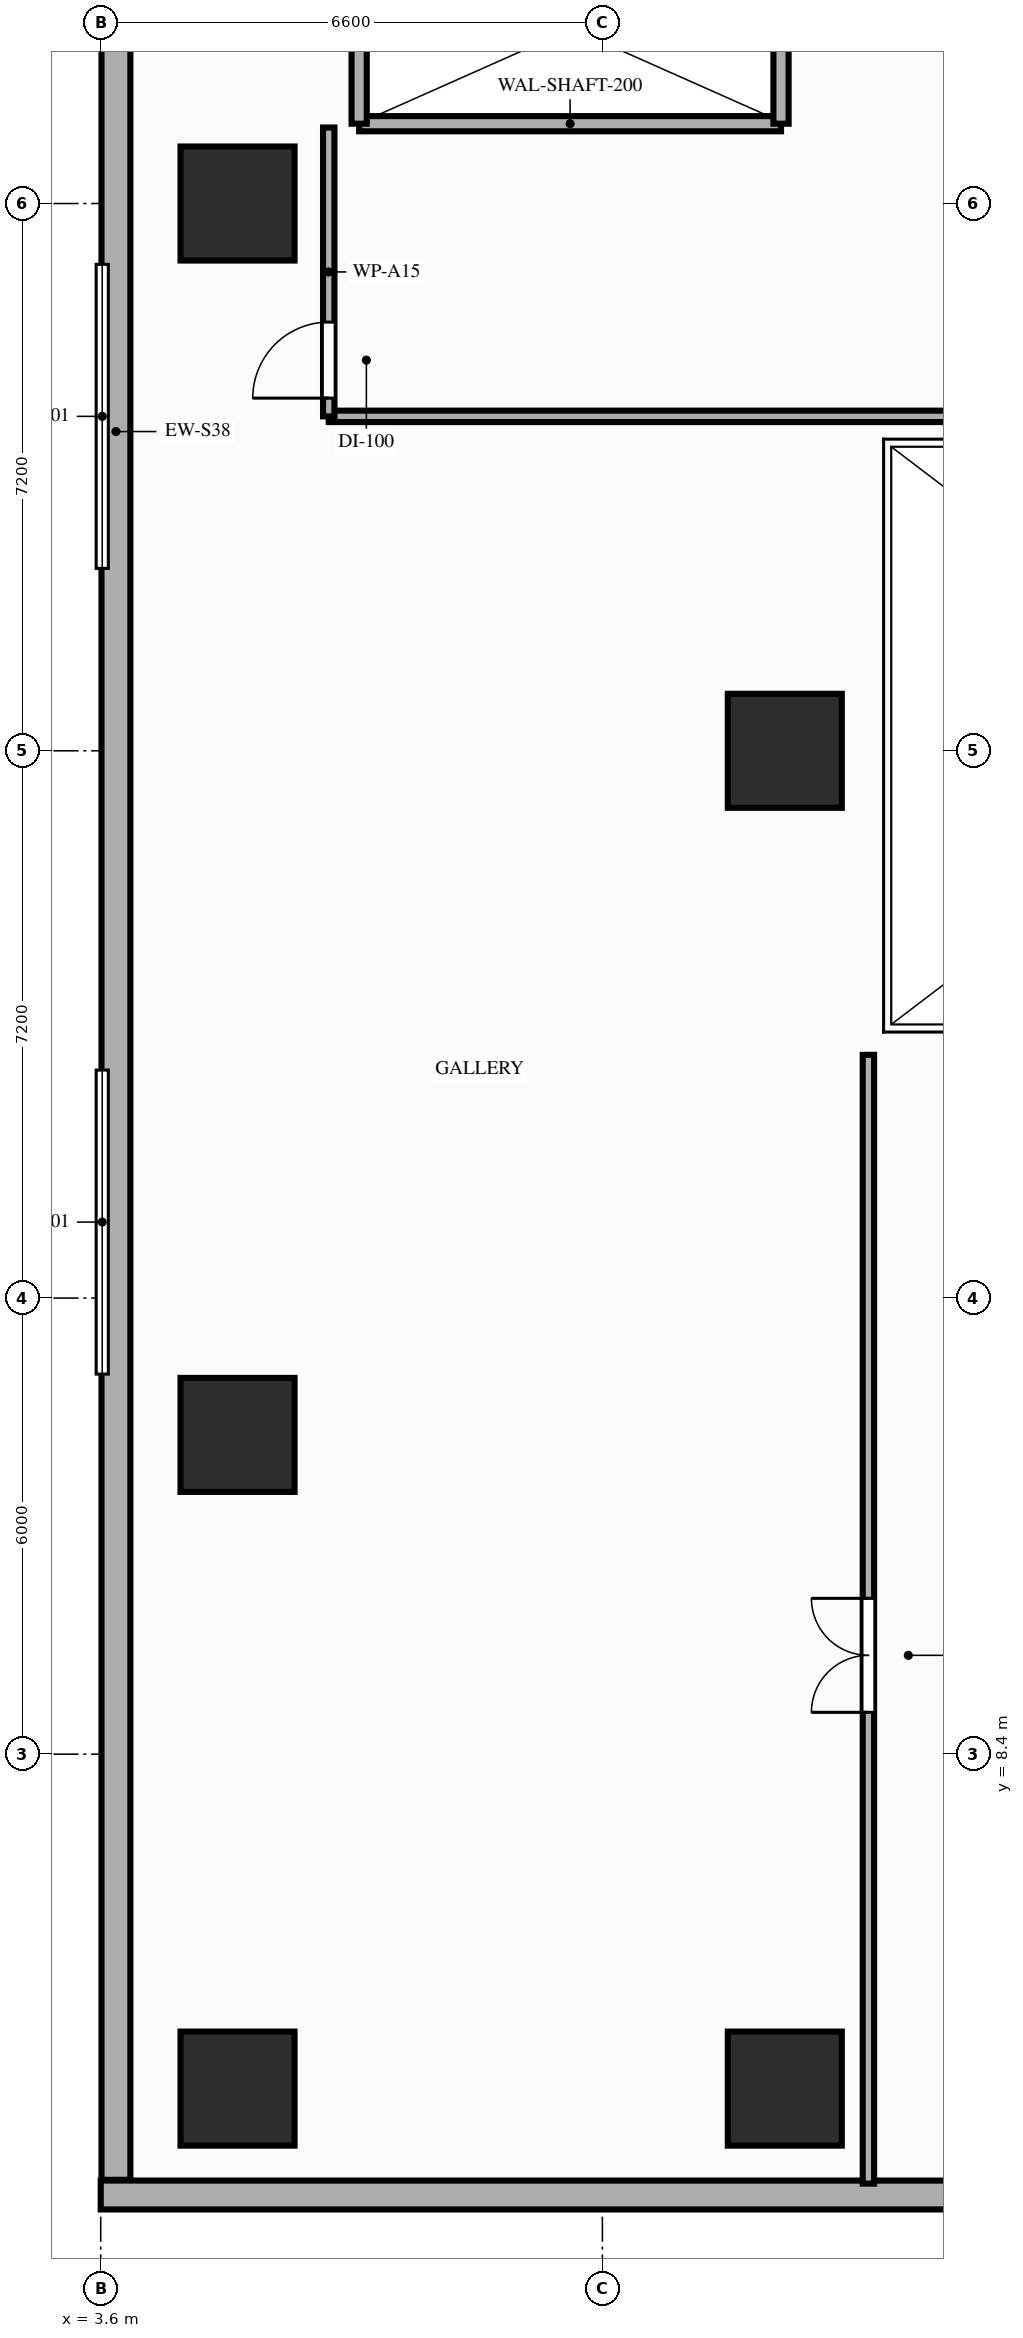
"""IFC4 building model, lengths in metres.
Left out: names, types, materials, properties, quantities, classifications, styles, units other than length and angle.
Written with IfcOpenShell. Run it as: python <this file> out.ifc"""

import sys

from ifc_helpers import new_model, si_unit, direction, frame, frame_2d, origin, origin_2d, place, context, subcontext, project, spatial, rectangle, extrude, element, fill, save


model = new_model("IFC4")
c1 = context("Model", 3, precision=1e-05, world=origin(), true_north=direction((0.0, 1.0)))
c2 = subcontext(c1, "Body", "Model", "MODEL_VIEW")
j1 = project(units=[si_unit("LENGTHUNIT", "METRE"), si_unit("PLANEANGLEUNIT", "RADIAN")], contexts=[c1])
p1 = place(None, origin())
s1 = spatial("IfcSite", under=j1, at=p1, CompositionType="ELEMENT")
p2 = place(p1, origin())
s2 = spatial("IfcBuilding", under=s1, at=p2, CompositionType="ELEMENT")
p3 = place(p2, frame((0.0, 0.0, 8.8)))
s3 = spatial("IfcBuildingStorey", under=s2, at=p3, CompositionType="ELEMENT", Elevation=8.8)
for number, where, z_axis, x_axis in (
    (1, (5.4, 12.6, 0.0), (0.0, 0.0, 1.0), (1.0, 0.0, 0.0)),
    (2, (5.4, 28.8, 0.0), (0.0, 0.0, 1.0), (1.0, 0.0, 0.0)),
    (3, (5.4, 4.0, 0.0), (0.0, 0.0, 1.0), (1.0, 0.0, 0.0)),
    (4, (12.6, 4.0, 0.0), (0.0, 0.0, 1.0), (1.0, 0.0, 0.0)),
    (5, (12.6, 21.6, 0.0), (0.0, 0.0, 1.0), (1.0, 0.0, 0.0)),
):
    element("IfcColumn", number, at=place(p3, frame(where, z_axis=z_axis, x_axis=x_axis)), inside=s3, PredefinedType="COLUMN", context=c2, shape_type="SweptSolid", body=[
        extrude(rectangle(XDim=1.5, YDim=1.5, at=origin_2d()), origin(), (0.0, 0.0, 1.0), 4.2),
    ])
p4 = place(p3, frame((3.6, 2.6, 0.0), z_axis=(0.0, 0.0, 1.0), x_axis=(1.0, 0.0, 0.0)))
e6 = element("IfcWall", 6, at=p4, inside=s3, PredefinedType="STANDARD", context=c2, shape_type="SweptSolid", body=[
    extrude(rectangle(XDim=69.6, YDim=0.38, at=frame_2d((34.8, 0.0))), origin(), (0.0, 0.0, 1.0), 3.95),
])
p5 = place(p4, frame((17.2, 0.0, 0.9)))
e7 = element("IfcOpeningElement", 7, at=p5, cuts=e6, PredefinedType="OPENING", context=c2, shape_type="SweptSolid", body=[
    extrude(rectangle(XDim=2.8, YDim=2.2, at=frame_2d((1.4, 1.1))), frame((0.0, 0.2, 0.0), z_axis=(0.0, -1.0, 0.0), x_axis=(1.0, 0.0, 0.0)), (0.0, 0.0, 1.0), 0.4),
])
p6 = place(p4, frame((24.6, 0.0, 0.9)))
e8 = element("IfcOpeningElement", 8, at=p6, cuts=e6, PredefinedType="OPENING", context=c2, shape_type="SweptSolid", body=[
    extrude(rectangle(XDim=2.8, YDim=2.2, at=frame_2d((1.4, 1.1))), frame((0.0, 0.2, 0.0), z_axis=(0.0, -1.0, 0.0), x_axis=(1.0, 0.0, 0.0)), (0.0, 0.0, 1.0), 0.4),
])
p7 = place(p4, frame((36.2, 0.0, 0.9)))
e9 = element("IfcOpeningElement", 9, at=p7, cuts=e6, PredefinedType="OPENING", context=c2, shape_type="SweptSolid", body=[
    extrude(rectangle(XDim=2.8, YDim=2.2, at=frame_2d((1.4, 1.1))), frame((0.0, 0.2, 0.0), z_axis=(0.0, -1.0, 0.0), x_axis=(1.0, 0.0, 0.0)), (0.0, 0.0, 1.0), 0.4),
])
p8 = place(p4, frame((48.4, 0.0, 0.9)))
e10 = element("IfcOpeningElement", 10, at=p8, cuts=e6, PredefinedType="OPENING", context=c2, shape_type="SweptSolid", body=[
    extrude(rectangle(XDim=2.8, YDim=2.2, at=frame_2d((1.4, 1.1))), frame((0.0, 0.2, 0.0), z_axis=(0.0, -1.0, 0.0), x_axis=(1.0, 0.0, 0.0)), (0.0, 0.0, 1.0), 0.4),
])
p9 = place(p4, frame((64.0, 0.0, 0.9)))
e11 = element("IfcOpeningElement", 11, at=p9, cuts=e6, PredefinedType="OPENING", context=c2, shape_type="SweptSolid", body=[
    extrude(rectangle(XDim=2.8, YDim=2.2, at=frame_2d((1.4, 1.1))), frame((0.0, 0.2, 0.0), z_axis=(0.0, -1.0, 0.0), x_axis=(1.0, 0.0, 0.0)), (0.0, 0.0, 1.0), 0.4),
])
p10 = place(p3, frame((3.8, 48.8, 0.0), z_axis=(0.0, 0.0, 1.0), x_axis=(0.0, -1.0, 0.0)))
e12 = element("IfcWall", 12, at=p10, inside=s3, PredefinedType="STANDARD", context=c2, shape_type="SweptSolid", body=[
    extrude(rectangle(XDim=46.0, YDim=0.38, at=frame_2d((23.0, 0.0))), origin(), (0.0, 0.0, 1.0), 3.95),
])
p11 = place(p3, frame((7.0, 29.85, 0.0), z_axis=(0.0, 0.0, 1.0), x_axis=(1.0, 0.0, 0.0)))
e13 = element("IfcWall", 13, at=p11, inside=s3, PredefinedType="MOVABLE", context=c2, shape_type="SweptSolid", body=[
    extrude(rectangle(XDim=5.55, YDim=0.2, at=frame_2d((2.775, 0.0))), origin(), (0.0, 0.0, 1.0), 3.95),
])
for number, where, z_axis, x_axis in (
    (14, (7.0, 29.85, 0.0), (0.0, 0.0, 1.0), (0.0, 1.0, 0.0)),
    (15, (12.55, 29.85, 0.0), (0.0, 0.0, 1.0), (0.0, 1.0, 0.0)),
):
    element("IfcWall", number, at=place(p3, frame(where, z_axis=z_axis, x_axis=x_axis)), inside=s3, PredefinedType="MOVABLE", context=c2, shape_type="SweptSolid", body=[
        extrude(rectangle(XDim=2.5, YDim=0.2, at=frame_2d((1.25, 0.0))), origin(), (0.0, 0.0, 1.0), 3.95),
    ])
p12 = place(p3, frame((6.6, 26.0, 0.0), z_axis=(0.0, 0.0, 1.0), x_axis=(1.0, 0.0, 0.0)))
e16 = element("IfcWall", 16, at=p12, inside=s3, PredefinedType="PARTITIONING", context=c2, shape_type="SweptSolid", body=[
    extrude(rectangle(XDim=17.8, YDim=0.15, at=frame_2d((8.9, 0.0))), origin(), (0.0, 0.0, 1.0), 3.13),
])
p13 = place(p3, frame((6.6, 26.0, 0.0), z_axis=(0.0, 0.0, 1.0), x_axis=(0.0, 1.0, 0.0)))
e17 = element("IfcWall", 17, at=p13, inside=s3, PredefinedType="PARTITIONING", context=c2, shape_type="SweptSolid", body=[
    extrude(rectangle(XDim=3.8, YDim=0.15, at=frame_2d((1.9, 0.0))), origin(), (0.0, 0.0, 1.0), 3.13),
])
p14 = place(p13, frame((0.24, 0.0, 0.0)))
e18 = element("IfcOpeningElement", 18, at=p14, cuts=e17, PredefinedType="OPENING", context=c2, shape_type="SweptSolid", body=[
    extrude(rectangle(XDim=1.0, YDim=2.15, at=frame_2d((0.5, 1.075))), frame((0.0, 0.085, 0.0), z_axis=(0.0, -1.0, 0.0), x_axis=(1.0, 0.0, 0.0)), (0.0, 0.0, 1.0), 0.17),
])
p15 = place(p3, frame((13.7, 2.75, 0.0), z_axis=(0.0, 0.0, 1.0), x_axis=(0.0, 1.0, 0.0)))
e19 = element("IfcWall", 19, at=p15, inside=s3, PredefinedType="PARTITIONING", context=c2, shape_type="SweptSolid", body=[
    extrude(rectangle(XDim=14.85, YDim=0.15, at=frame_2d((7.425, 0.0))), origin(), (0.0, 0.0, 1.0), 3.13),
])
p16 = place(p15, frame((6.2, 0.0, 0.0)))
e20 = element("IfcOpeningElement", 20, at=p16, cuts=e19, PredefinedType="OPENING", context=c2, shape_type="SweptSolid", body=[
    extrude(rectangle(XDim=1.5, YDim=2.18, at=frame_2d((0.75, 1.09))), frame((0.0, 0.085, 0.0), z_axis=(0.0, -1.0, 0.0), x_axis=(1.0, 0.0, 0.0)), (0.0, 0.0, 1.0), 0.17),
])
p17 = place(p14, origin())
e21 = element("IfcDoor", 21, at=p17, inside=s3, OperationType="SINGLE_SWING_LEFT", PredefinedType="DOOR", context=c2, shape_type="SweptSolid", body=[
    extrude(rectangle(XDim=1.0, YDim=2.15, at=frame_2d((0.5, 1.075))), frame((0.0, 0.025, 0.0), z_axis=(0.0, -1.0, 0.0), x_axis=(1.0, 0.0, 0.0)), (0.0, 0.0, 1.0), 0.05),
])
fill(e18, e21)
p18 = place(p16, origin())
e22 = element("IfcDoor", 22, at=p18, inside=s3, OperationType="DOUBLE_DOOR_SINGLE_SWING", PredefinedType="DOOR", context=c2, shape_type="SweptSolid", body=[
    extrude(rectangle(XDim=1.5, YDim=2.18, at=frame_2d((0.75, 1.09))), frame((0.0, 0.025, 0.0), z_axis=(0.0, -1.0, 0.0), x_axis=(1.0, 0.0, 0.0)), (0.0, 0.0, 1.0), 0.05),
])
fill(e20, e22)
save(model, sys.argv[1])
